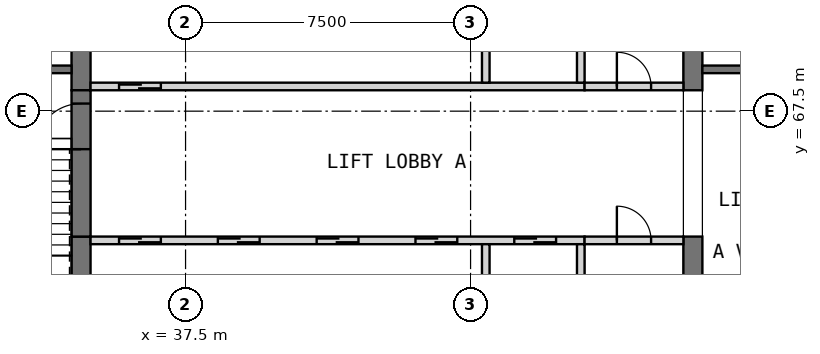
"""IFC4 building model, lengths in metres.
Left out: names, types, materials, properties, quantities, classifications, styles, units other than length and angle.
Written with IfcOpenShell. Run it as: python <this file> out.ifc"""

import sys

from ifc_helpers import new_model, si_unit, direction, frame, frame_2d, origin, place, context, subcontext, project, spatial, rectangle, extrude, element, fill, save


model = new_model("IFC4")
c1 = context("Model", 3, precision=1e-05, world=origin(), true_north=direction((0.0, 1.0)))
c2 = subcontext(c1, "Body", "Model", "MODEL_VIEW")
j1 = project(units=[si_unit("LENGTHUNIT", "METRE"), si_unit("PLANEANGLEUNIT", "RADIAN")], contexts=[c1])
p1 = place(None, origin())
s1 = spatial("IfcSite", under=j1, at=p1, CompositionType="ELEMENT")
p2 = place(p1, origin())
s2 = spatial("IfcBuilding", under=s1, at=p2, CompositionType="ELEMENT")
p3 = place(p2, frame((0.0, 0.0, 34.0)))
s3 = spatial("IfcBuildingStorey", under=s2, at=p3, CompositionType="ELEMENT", Elevation=34.0)
p4 = place(p3, frame((34.75, 61.0, 0.0), z_axis=(0.0, 0.0, 1.0), x_axis=(0.0, 1.0, 0.0)))
e1 = element("IfcWall", 1, at=p4, inside=s3, PredefinedType="SHEAR", context=c2, shape_type="SweptSolid", body=[
    extrude(rectangle(XDim=3.2, YDim=0.5, at=frame_2d((1.6, 0.0))), origin(), (0.0, 0.0, 1.0), 3.6),
])
p5 = place(p3, frame((34.75, 68.05, 0.0), z_axis=(0.0, 0.0, 1.0), x_axis=(0.0, 1.0, 0.0)))
e2 = element("IfcWall", 2, at=p5, inside=s3, PredefinedType="SHEAR", context=c2, shape_type="SweptSolid", body=[
    extrude(rectangle(XDim=6.4, YDim=0.5, at=frame_2d((3.2, 0.0))), origin(), (0.0, 0.0, 1.0), 3.6),
])
p6 = place(p3, frame((50.85, 61.0, 0.0), z_axis=(0.0, 0.0, 1.0), x_axis=(0.0, 1.0, 0.0)))
e3 = element("IfcWall", 3, at=p6, inside=s3, PredefinedType="SHEAR", context=c2, shape_type="SweptSolid", body=[
    extrude(rectangle(XDim=3.2, YDim=0.5, at=frame_2d((1.6, 0.0))), origin(), (0.0, 0.0, 1.0), 3.6),
])
p7 = place(p3, frame((50.85, 68.05, 0.0), z_axis=(0.0, 0.0, 1.0), x_axis=(0.0, 1.0, 0.0)))
e4 = element("IfcWall", 4, at=p7, inside=s3, PredefinedType="SHEAR", context=c2, shape_type="SweptSolid", body=[
    extrude(rectangle(XDim=6.4, YDim=0.5, at=frame_2d((3.2, 0.0))), origin(), (0.0, 0.0, 1.0), 3.6),
])
p8 = place(p3, frame((35.0, 64.1, 0.0), z_axis=(0.0, 0.0, 1.0), x_axis=(1.0, 0.0, 0.0)))
e5 = element("IfcWall", 5, at=p8, inside=s3, PredefinedType="SOLIDWALL", context=c2, shape_type="SweptSolid", body=[
    extrude(rectangle(XDim=13.0, YDim=0.2, at=frame_2d((6.5, 0.0))), origin(), (0.0, 0.0, 1.0), 3.6),
])
p9 = place(p8, frame((0.75, 0.0, 0.0)))
e6 = element("IfcOpeningElement", 6, at=p9, cuts=e5, PredefinedType="OPENING", context=c2, shape_type="SweptSolid", body=[
    extrude(rectangle(XDim=1.1, YDim=2.1, at=frame_2d((0.55, 1.05))), frame((0.0, 0.11, 0.0), z_axis=(0.0, -1.0, 0.0), x_axis=(1.0, 0.0, 0.0)), (0.0, 0.0, 1.0), 0.22),
])
p10 = place(p8, frame((3.35, 0.0, 0.0)))
e7 = element("IfcOpeningElement", 7, at=p10, cuts=e5, PredefinedType="OPENING", context=c2, shape_type="SweptSolid", body=[
    extrude(rectangle(XDim=1.1, YDim=2.1, at=frame_2d((0.55, 1.05))), frame((0.0, 0.11, 0.0), z_axis=(0.0, -1.0, 0.0), x_axis=(1.0, 0.0, 0.0)), (0.0, 0.0, 1.0), 0.22),
])
p11 = place(p8, frame((5.95, 0.0, 0.0)))
e8 = element("IfcOpeningElement", 8, at=p11, cuts=e5, PredefinedType="OPENING", context=c2, shape_type="SweptSolid", body=[
    extrude(rectangle(XDim=1.1, YDim=2.1, at=frame_2d((0.55, 1.05))), frame((0.0, 0.11, 0.0), z_axis=(0.0, -1.0, 0.0), x_axis=(1.0, 0.0, 0.0)), (0.0, 0.0, 1.0), 0.22),
])
p12 = place(p8, frame((8.55, 0.0, 0.0)))
e9 = element("IfcOpeningElement", 9, at=p12, cuts=e5, PredefinedType="OPENING", context=c2, shape_type="SweptSolid", body=[
    extrude(rectangle(XDim=1.1, YDim=2.1, at=frame_2d((0.55, 1.05))), frame((0.0, 0.11, 0.0), z_axis=(0.0, -1.0, 0.0), x_axis=(1.0, 0.0, 0.0)), (0.0, 0.0, 1.0), 0.22),
])
p13 = place(p8, frame((11.15, 0.0, 0.0)))
e10 = element("IfcOpeningElement", 10, at=p13, cuts=e5, PredefinedType="OPENING", context=c2, shape_type="SweptSolid", body=[
    extrude(rectangle(XDim=1.1, YDim=2.1, at=frame_2d((0.55, 1.05))), frame((0.0, 0.11, 0.0), z_axis=(0.0, -1.0, 0.0), x_axis=(1.0, 0.0, 0.0)), (0.0, 0.0, 1.0), 0.22),
])
for number, where, z_axis, x_axis in (
    (11, (45.4, 61.0, 0.0), (0.0, 0.0, 1.0), (0.0, 1.0, 0.0)),
    (12, (47.9, 61.0, 0.0), (0.0, 0.0, 1.0), (0.0, 1.0, 0.0)),
):
    element("IfcWall", number, at=place(p3, frame(where, z_axis=z_axis, x_axis=x_axis)), inside=s3, PredefinedType="SOLIDWALL", context=c2, shape_type="SweptSolid", body=[
        extrude(rectangle(XDim=3.0, YDim=0.2, at=frame_2d((1.5, 0.0))), origin(), (0.0, 0.0, 1.0), 3.6),
    ])
p14 = place(p3, frame((48.0, 64.1, 0.0), z_axis=(0.0, 0.0, 1.0), x_axis=(1.0, 0.0, 0.0)))
e13 = element("IfcWall", 13, at=p14, inside=s3, PredefinedType="PARTITIONING", context=c2, shape_type="SweptSolid", body=[
    extrude(rectangle(XDim=2.6, YDim=0.2, at=frame_2d((1.3, 0.0))), origin(), (0.0, 0.0, 1.0), 3.35),
])
p15 = place(p14, frame((0.85, 0.0, 0.0)))
e14 = element("IfcOpeningElement", 14, at=p15, cuts=e13, PredefinedType="OPENING", context=c2, shape_type="SweptSolid", body=[
    extrude(rectangle(XDim=0.9, YDim=2.1, at=frame_2d((0.45, 1.05))), frame((0.0, 0.11, 0.0), z_axis=(0.0, -1.0, 0.0), x_axis=(1.0, 0.0, 0.0)), (0.0, 0.0, 1.0), 0.22),
])
p16 = place(p3, frame((35.0, 68.15, 0.0), z_axis=(0.0, 0.0, 1.0), x_axis=(1.0, 0.0, 0.0)))
e15 = element("IfcWall", 15, at=p16, inside=s3, PredefinedType="SOLIDWALL", context=c2, shape_type="SweptSolid", body=[
    extrude(rectangle(XDim=13.0, YDim=0.2, at=frame_2d((6.5, 0.0))), origin(), (0.0, 0.0, 1.0), 3.6),
])
p17 = place(p16, frame((0.75, 0.0, 0.0)))
e16 = element("IfcOpeningElement", 16, at=p17, cuts=e15, PredefinedType="OPENING", context=c2, shape_type="SweptSolid", body=[
    extrude(rectangle(XDim=1.1, YDim=2.1, at=frame_2d((0.55, 1.05))), frame((0.0, 0.11, 0.0), z_axis=(0.0, -1.0, 0.0), x_axis=(1.0, 0.0, 0.0)), (0.0, 0.0, 1.0), 0.22),
])
for number, where, z_axis, x_axis in (
    (17, (45.4, 68.25, 0.0), (0.0, 0.0, 1.0), (0.0, 1.0, 0.0)),
    (18, (47.9, 68.25, 0.0), (0.0, 0.0, 1.0), (0.0, 1.0, 0.0)),
):
    element("IfcWall", number, at=place(p3, frame(where, z_axis=z_axis, x_axis=x_axis)), inside=s3, PredefinedType="SOLIDWALL", context=c2, shape_type="SweptSolid", body=[
        extrude(rectangle(XDim=2.75, YDim=0.2, at=frame_2d((1.375, 0.0))), origin(), (0.0, 0.0, 1.0), 3.6),
    ])
p18 = place(p3, frame((48.0, 68.15, 0.0), z_axis=(0.0, 0.0, 1.0), x_axis=(1.0, 0.0, 0.0)))
e19 = element("IfcWall", 19, at=p18, inside=s3, PredefinedType="PARTITIONING", context=c2, shape_type="SweptSolid", body=[
    extrude(rectangle(XDim=2.6, YDim=0.2, at=frame_2d((1.3, 0.0))), origin(), (0.0, 0.0, 1.0), 3.35),
])
p19 = place(p18, frame((0.85, 0.0, 0.0)))
e20 = element("IfcOpeningElement", 20, at=p19, cuts=e19, PredefinedType="OPENING", context=c2, shape_type="SweptSolid", body=[
    extrude(rectangle(XDim=0.9, YDim=2.1, at=frame_2d((0.45, 1.05))), frame((0.0, 0.11, 0.0), z_axis=(0.0, -1.0, 0.0), x_axis=(1.0, 0.0, 0.0)), (0.0, 0.0, 1.0), 0.22),
])
p20 = place(p3, frame((34.75, 64.2, 0.0), z_axis=(0.0, 0.0, 1.0), x_axis=(0.0, 1.0, 0.0)))
e21 = element("IfcWall", 21, at=p20, inside=s3, PredefinedType="SOLIDWALL", context=c2, shape_type="SweptSolid", body=[
    extrude(rectangle(XDim=3.85, YDim=0.5, at=frame_2d((1.925, 0.0))), origin(), (0.0, 0.0, 1.0), 2.4),
])
p21 = place(p20, frame((2.3, 0.0, 0.0)))
e22 = element("IfcOpeningElement", 22, at=p21, cuts=e21, PredefinedType="OPENING", context=c2, shape_type="SweptSolid", body=[
    extrude(rectangle(XDim=1.2, YDim=2.1, at=frame_2d((0.6, 1.05))), frame((0.0, 0.26, 0.0), z_axis=(0.0, -1.0, 0.0), x_axis=(1.0, 0.0, 0.0)), (0.0, 0.0, 1.0), 0.52),
])
p22 = place(p3, frame((31.0, 68.6, 0.0), z_axis=(0.0, 0.0, 1.0), x_axis=(1.0, 0.0, 0.0)))
e23 = element("IfcWall", 23, at=p22, inside=s3, PredefinedType="SOLIDWALL", context=c2, shape_type="SweptSolid", body=[
    extrude(rectangle(XDim=3.5, YDim=0.2, at=frame_2d((1.75, 0.0))), origin(), (0.0, 0.0, 1.0), 3.35),
])
p23 = place(p22, frame((1.3, 0.0, 0.0)))
e24 = element("IfcOpeningElement", 24, at=p23, cuts=e23, PredefinedType="OPENING", context=c2, shape_type="SweptSolid", body=[
    extrude(rectangle(XDim=0.9, YDim=2.1, at=frame_2d((0.45, 1.05))), frame((0.0, 0.11, 0.0), z_axis=(0.0, -1.0, 0.0), x_axis=(1.0, 0.0, 0.0)), (0.0, 0.0, 1.0), 0.22),
])
p24 = place(p3, frame((51.1, 68.6, 0.0), z_axis=(0.0, 0.0, 1.0), x_axis=(1.0, 0.0, 0.0)))
e25 = element("IfcWall", 25, at=p24, inside=s3, PredefinedType="SOLIDWALL", context=c2, shape_type="SweptSolid", body=[
    extrude(rectangle(XDim=7.9, YDim=0.2, at=frame_2d((3.95, 0.0))), origin(), (0.0, 0.0, 1.0), 3.35),
])
p25 = place(p9, origin())
e26 = element("IfcDoor", 26, at=p25, inside=s3, OperationType="DOUBLE_DOOR_SLIDING", PredefinedType="DOOR", context=c2, shape_type="SweptSolid", body=[
    extrude(rectangle(XDim=1.1, YDim=2.1, at=frame_2d((0.55, 1.05))), frame((0.0, 0.025, 0.0), z_axis=(0.0, -1.0, 0.0), x_axis=(1.0, 0.0, 0.0)), (0.0, 0.0, 1.0), 0.05),
])
fill(e6, e26)
p26 = place(p10, origin())
e27 = element("IfcDoor", 27, at=p26, inside=s3, OperationType="DOUBLE_DOOR_SLIDING", PredefinedType="DOOR", context=c2, shape_type="SweptSolid", body=[
    extrude(rectangle(XDim=1.1, YDim=2.1, at=frame_2d((0.55, 1.05))), frame((0.0, 0.025, 0.0), z_axis=(0.0, -1.0, 0.0), x_axis=(1.0, 0.0, 0.0)), (0.0, 0.0, 1.0), 0.05),
])
fill(e7, e27)
p27 = place(p11, origin())
e28 = element("IfcDoor", 28, at=p27, inside=s3, OperationType="DOUBLE_DOOR_SLIDING", PredefinedType="DOOR", context=c2, shape_type="SweptSolid", body=[
    extrude(rectangle(XDim=1.1, YDim=2.1, at=frame_2d((0.55, 1.05))), frame((0.0, 0.025, 0.0), z_axis=(0.0, -1.0, 0.0), x_axis=(1.0, 0.0, 0.0)), (0.0, 0.0, 1.0), 0.05),
])
fill(e8, e28)
p28 = place(p12, origin())
e29 = element("IfcDoor", 29, at=p28, inside=s3, OperationType="DOUBLE_DOOR_SLIDING", PredefinedType="DOOR", context=c2, shape_type="SweptSolid", body=[
    extrude(rectangle(XDim=1.1, YDim=2.1, at=frame_2d((0.55, 1.05))), frame((0.0, 0.025, 0.0), z_axis=(0.0, -1.0, 0.0), x_axis=(1.0, 0.0, 0.0)), (0.0, 0.0, 1.0), 0.05),
])
fill(e9, e29)
p29 = place(p13, origin())
e30 = element("IfcDoor", 30, at=p29, inside=s3, OperationType="DOUBLE_DOOR_SLIDING", PredefinedType="DOOR", context=c2, shape_type="SweptSolid", body=[
    extrude(rectangle(XDim=1.1, YDim=2.1, at=frame_2d((0.55, 1.05))), frame((0.0, 0.025, 0.0), z_axis=(0.0, -1.0, 0.0), x_axis=(1.0, 0.0, 0.0)), (0.0, 0.0, 1.0), 0.05),
])
fill(e10, e30)
p30 = place(p15, origin())
e31 = element("IfcDoor", 31, at=p30, inside=s3, OperationType="SINGLE_SWING_RIGHT", PredefinedType="DOOR", context=c2, shape_type="SweptSolid", body=[
    extrude(rectangle(XDim=0.9, YDim=2.1, at=frame_2d((0.45, 1.05))), frame((0.0, 0.025, 0.0), z_axis=(0.0, -1.0, 0.0), x_axis=(1.0, 0.0, 0.0)), (0.0, 0.0, 1.0), 0.05),
])
fill(e14, e31)
p31 = place(p17, origin())
e32 = element("IfcDoor", 32, at=p31, inside=s3, OperationType="DOUBLE_DOOR_SLIDING", PredefinedType="DOOR", context=c2, shape_type="SweptSolid", body=[
    extrude(rectangle(XDim=1.1, YDim=2.1, at=frame_2d((0.55, 1.05))), frame((0.0, 0.025, 0.0), z_axis=(0.0, -1.0, 0.0), x_axis=(1.0, 0.0, 0.0)), (0.0, 0.0, 1.0), 0.05),
])
fill(e16, e32)
p32 = place(p19, origin())
e33 = element("IfcDoor", 33, at=p32, inside=s3, OperationType="SINGLE_SWING_RIGHT", PredefinedType="DOOR", context=c2, shape_type="SweptSolid", body=[
    extrude(rectangle(XDim=0.9, YDim=2.1, at=frame_2d((0.45, 1.05))), frame((0.0, 0.025, 0.0), z_axis=(0.0, -1.0, 0.0), x_axis=(1.0, 0.0, 0.0)), (0.0, 0.0, 1.0), 0.05),
])
fill(e20, e33)
p33 = place(p21, origin())
e34 = element("IfcDoor", 34, at=p33, inside=s3, OperationType="SINGLE_SWING_LEFT", PredefinedType="DOOR", context=c2, shape_type="SweptSolid", body=[
    extrude(rectangle(XDim=1.2, YDim=2.1, at=frame_2d((0.6, 1.05))), frame((0.0, 0.025, 0.0), z_axis=(0.0, -1.0, 0.0), x_axis=(1.0, 0.0, 0.0)), (0.0, 0.0, 1.0), 0.05),
])
fill(e22, e34)
save(model, sys.argv[1])
